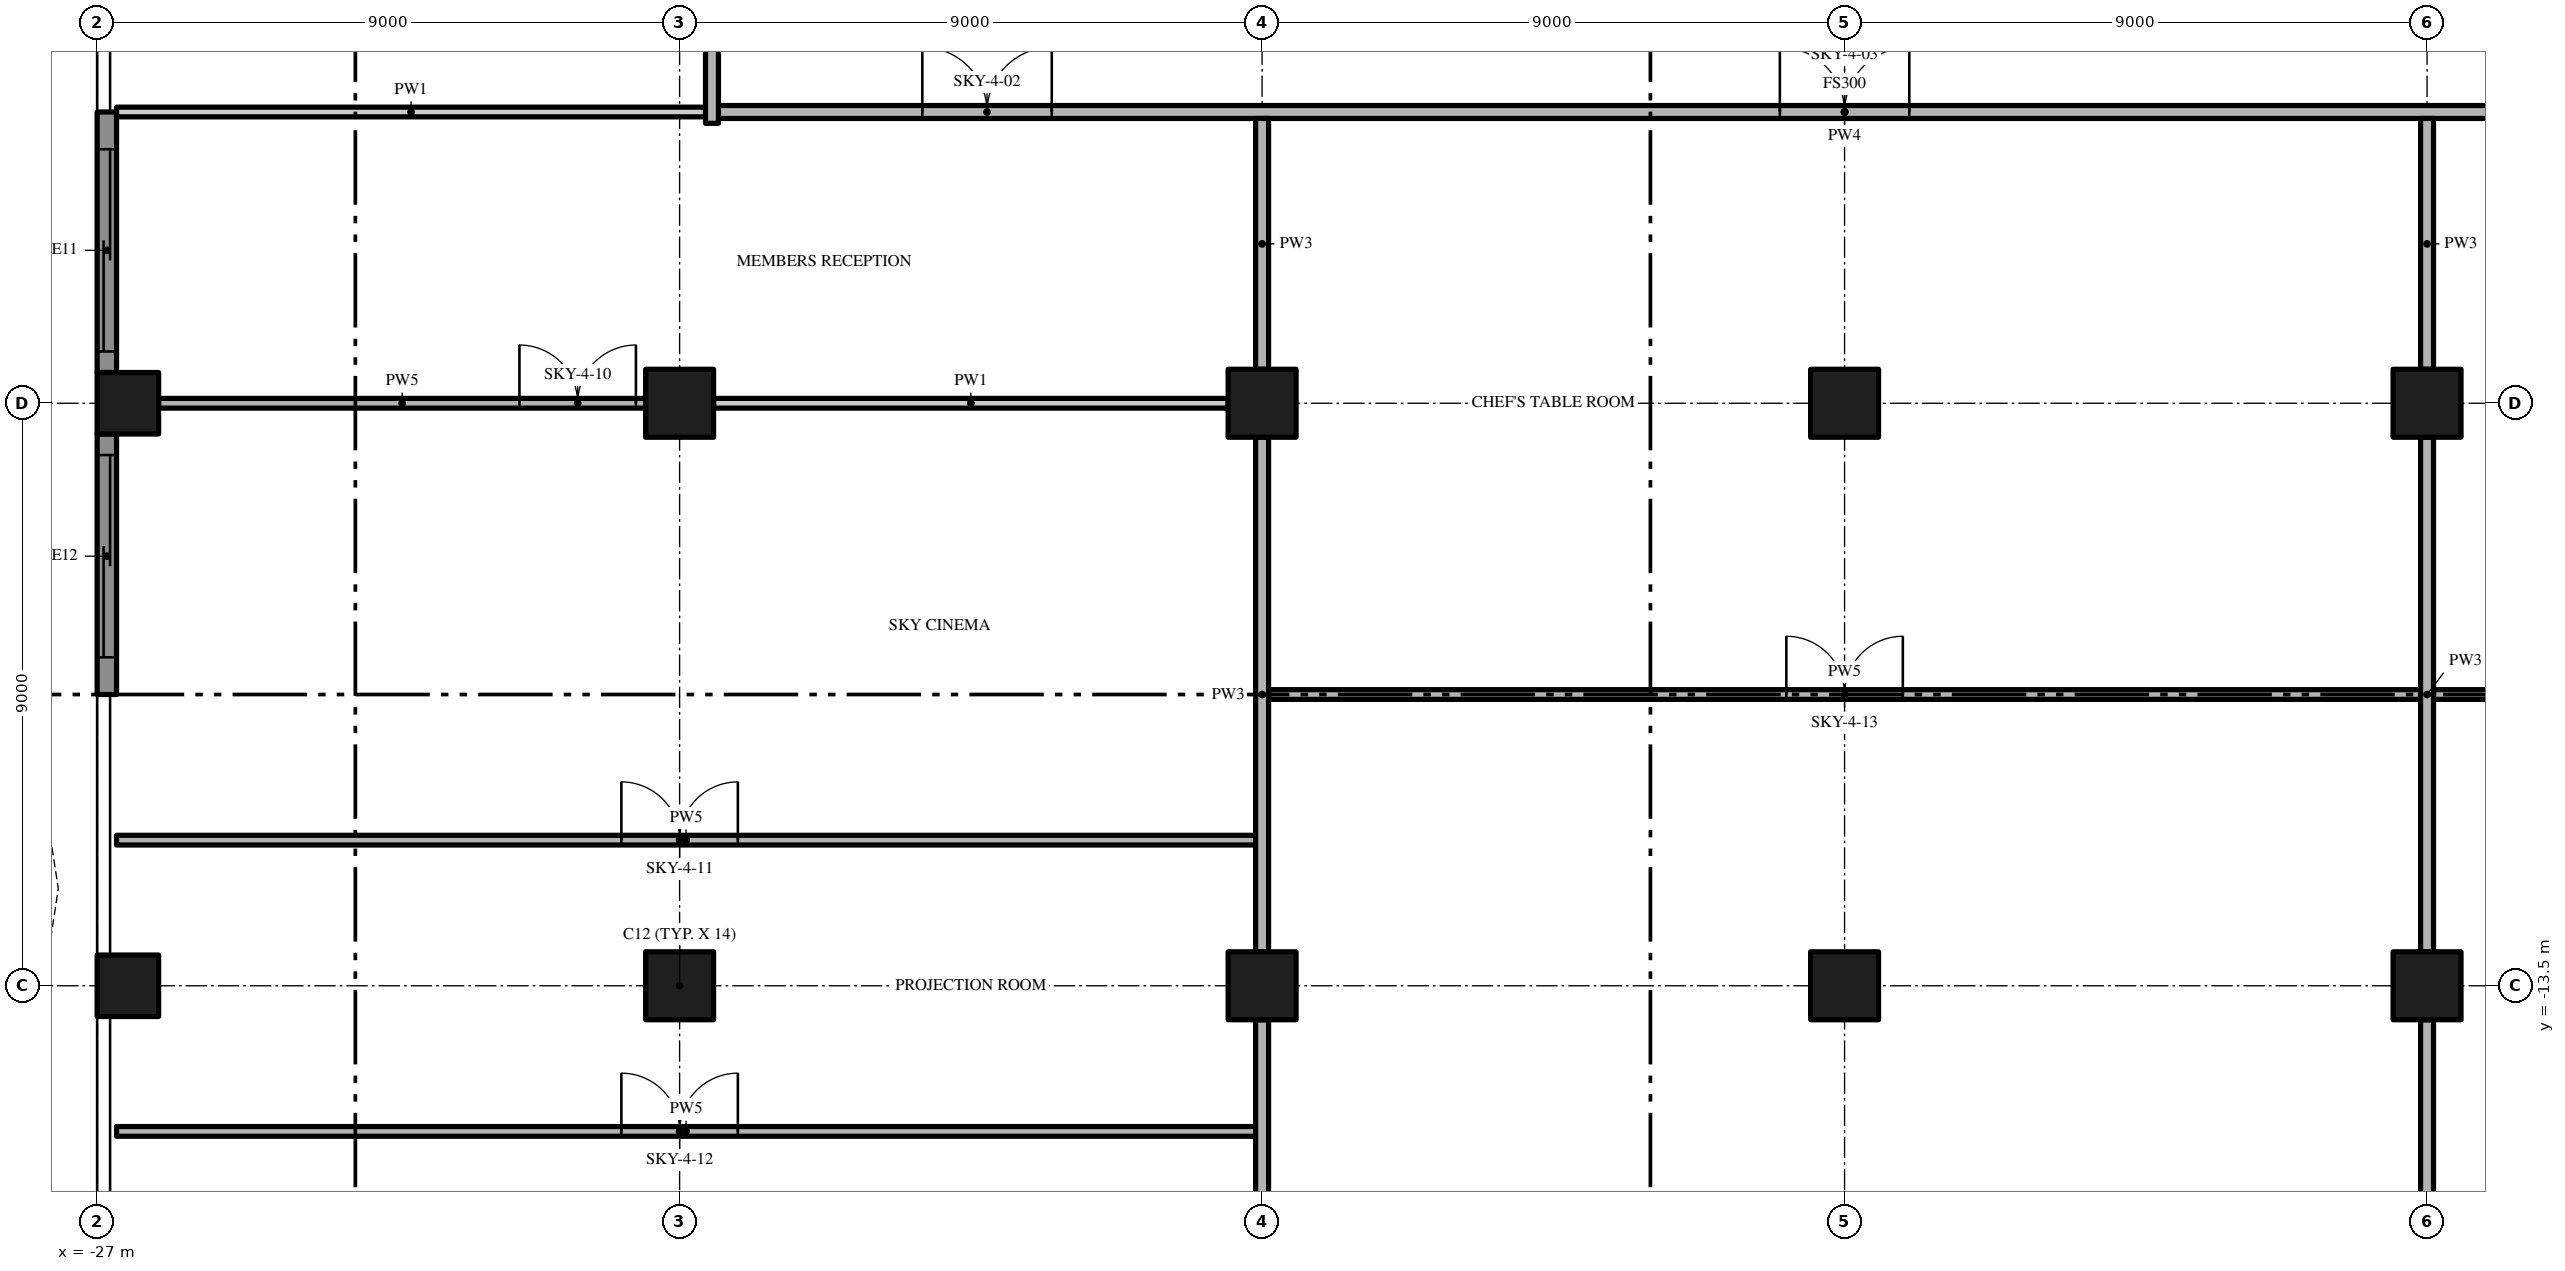
"""IFC4 building model, lengths in metres.
Left out: names, types, materials, properties, quantities, classifications, styles, units other than length and angle.
Written with IfcOpenShell. Run it as: python <this file> out.ifc"""

import sys

from ifc_helpers import new_model, si_unit, direction, frame, frame_2d, origin, origin_2d, place, context, subcontext, project, spatial, polyline, rectangle, outline, extrude, element, fill, save


model = new_model("IFC4")
c1 = context("Model", 3, precision=1e-05, world=origin(), true_north=direction((0.0, 1.0)))
c2 = subcontext(c1, "Body", "Model", "MODEL_VIEW")
j1 = project(units=[si_unit("LENGTHUNIT", "METRE"), si_unit("PLANEANGLEUNIT", "RADIAN")], contexts=[c1])
p1 = place(None, origin())
s1 = spatial("IfcSite", under=j1, at=p1, CompositionType="ELEMENT")
p2 = place(p1, origin())
s2 = spatial("IfcBuilding", under=s1, at=p2, CompositionType="ELEMENT")
p3 = place(p2, frame((0.0, 0.0, 233.8)))
s3 = spatial("IfcBuildingStorey", under=s2, at=p3, CompositionType="ELEMENT", Elevation=233.8)
for number, where, z_axis, x_axis in (
    (1, (-18.0, -13.5, 0.0), (0.0, 0.0, 1.0), (1.0, 0.0, 0.0)),
    (2, (-18.0, -4.5, 0.0), (0.0, 0.0, 1.0), (1.0, 0.0, 0.0)),
):
    element("IfcColumn", number, at=place(p3, frame(where, z_axis=z_axis, x_axis=x_axis)), inside=s3, PredefinedType="COLUMN", context=c2, shape_type="SweptSolid", body=[
        extrude(rectangle(XDim=1.05, YDim=1.05, at=origin_2d()), origin(), (0.0, 0.0, 1.0), 4.7),
    ])
for number, where, z_axis, x_axis in (
    (3, (-26.525, -13.5, 0.0), (0.0, 0.0, 1.0), (1.0, 0.0, 0.0)),
    (4, (-26.525, -4.5, 0.0), (0.0, 0.0, 1.0), (1.0, 0.0, 0.0)),
):
    element("IfcColumn", number, at=place(p3, frame(where, z_axis=z_axis, x_axis=x_axis)), inside=s3, PredefinedType="COLUMN", context=c2, shape_type="SweptSolid", body=[
        extrude(rectangle(XDim=0.95, YDim=0.95, at=origin_2d()), origin(), (0.0, 0.0, 1.0), 4.7),
    ])
for number, where, z_axis, x_axis in (
    (5, (-9.0, -13.5, 0.0), (0.0, 0.0, 1.0), (1.0, 0.0, 0.0)),
    (6, (-9.0, -4.5, 0.0), (0.0, 0.0, 1.0), (1.0, 0.0, 0.0)),
    (7, (0.0, -13.5, 0.0), (0.0, 0.0, 1.0), (1.0, 0.0, 0.0)),
    (8, (0.0, -4.5, 0.0), (0.0, 0.0, 1.0), (1.0, 0.0, 0.0)),
    (9, (9.0, -13.5, 0.0), (0.0, 0.0, 1.0), (1.0, 0.0, 0.0)),
    (10, (9.0, -4.5, 0.0), (0.0, 0.0, 1.0), (1.0, 0.0, 0.0)),
):
    element("IfcColumn", number, at=place(p3, frame(where, z_axis=z_axis, x_axis=x_axis)), inside=s3, PredefinedType="COLUMN", context=c2, shape_type="SweptSolid", body=[
        extrude(rectangle(XDim=1.05, YDim=1.05, at=origin_2d()), origin(), (0.0, 0.0, 1.0), 4.7),
    ])
p4 = place(p3, frame((-26.85, -4.025, 0.0), z_axis=(0.0, 0.0, 1.0), x_axis=(0.0, 1.0, 0.0)))
e11 = element("IfcWall", 11, at=p4, inside=s3, PredefinedType="SOLIDWALL", context=c2, shape_type="SweptSolid", body=[
    extrude(rectangle(XDim=4.025, YDim=0.3, at=frame_2d((2.013, 0.0))), origin(), (0.0, 0.0, 1.0), 4.7),
])
p5 = place(p4, frame((0.325, 0.0, 0.0)))
e12 = element("IfcOpeningElement", 12, at=p5, cuts=e11, PredefinedType="OPENING", context=c2, shape_type="SweptSolid", body=[
    extrude(rectangle(XDim=3.125, YDim=2.4, at=frame_2d((1.562, 1.2))), frame((0.0, 0.16, 0.0), z_axis=(0.0, -1.0, 0.0), x_axis=(1.0, 0.0, 0.0)), (0.0, 0.0, 1.0), 0.32),
])
p6 = place(p3, frame((-26.85, -9.0, 0.0), z_axis=(0.0, 0.0, 1.0), x_axis=(0.0, 1.0, 0.0)))
e13 = element("IfcWall", 13, at=p6, inside=s3, PredefinedType="SOLIDWALL", context=c2, shape_type="SweptSolid", body=[
    extrude(rectangle(XDim=4.025, YDim=0.3, at=frame_2d((2.013, 0.0))), origin(), (0.0, 0.0, 1.0), 4.7),
])
p7 = place(p6, frame((0.575, 0.0, 0.0)))
e14 = element("IfcOpeningElement", 14, at=p7, cuts=e13, PredefinedType="OPENING", context=c2, shape_type="SweptSolid", body=[
    extrude(rectangle(XDim=3.125, YDim=2.4, at=frame_2d((1.562, 1.2))), frame((0.0, 0.16, 0.0), z_axis=(0.0, -1.0, 0.0), x_axis=(1.0, 0.0, 0.0)), (0.0, 0.0, 1.0), 0.32),
])
p8 = place(p3, origin())
e15 = element("IfcWall", 15, at=p8, inside=s3, PredefinedType="USERDEFINED", context=c2, shape_type="SweptSolid", body=[
    extrude(outline(polyline([(-27.6, 18.0), (-27.829, 16.5), (-28.429, 15.0), (-29.171, 13.5), (-29.771, 12.0), (-30.0, 10.5), (-29.771, 9.0), (-29.171, 7.5), (-28.429, 6.0), (-27.829, 4.5), (-27.6, 3.0), (-27.829, 1.5), (-28.429, 0.0), (-29.171, -1.5), (-29.771, -3.0), (-30.0, -4.5), (-29.771, -6.0), (-29.171, -7.5), (-28.429, -9.0), (-27.829, -10.5), (-27.6, -12.0), (-27.829, -13.5), (-28.429, -15.0), (-29.171, -16.5), (-29.771, -18.0), (-29.539, -18.093), (-28.942, -16.602), (-28.201, -15.102), (-27.586, -13.566), (-27.347, -12.0), (-27.586, -10.434), (-28.201, -8.898), (-28.942, -7.398), (-29.528, -5.934), (-29.747, -4.5), (-29.528, -3.066), (-28.942, -1.602), (-28.201, -0.102), (-27.586, 1.434), (-27.347, 3.0), (-27.586, 4.566), (-28.201, 6.102), (-28.942, 7.602), (-29.528, 9.066), (-29.747, 10.5), (-29.528, 11.934), (-28.942, 13.398), (-28.201, 14.898), (-27.586, 16.434), (-27.353, 17.962), (-27.6, 18.0)])), origin(), (0.0, 0.0, 1.0), 0.9),
])
p9 = place(p3, frame((-26.7, -15.75, 0.0), z_axis=(0.0, 0.0, 1.0), x_axis=(1.0, 0.0, 0.0)))
e16 = element("IfcWall", 16, at=p9, inside=s3, PredefinedType="PARTITIONING", context=c2, shape_type="SweptSolid", body=[
    extrude(rectangle(XDim=17.6, YDim=0.15, at=frame_2d((8.8, 0.0))), origin(), (0.0, 0.0, 1.0), 4.7),
])
p10 = place(p9, frame((7.8, 0.0, 0.0)))
e17 = element("IfcOpeningElement", 17, at=p10, cuts=e16, PredefinedType="OPENING", context=c2, shape_type="SweptSolid", body=[
    extrude(rectangle(XDim=1.8, YDim=2.4, at=frame_2d((0.9, 1.2))), frame((0.0, 0.085, 0.0), z_axis=(0.0, -1.0, 0.0), x_axis=(1.0, 0.0, 0.0)), (0.0, 0.0, 1.0), 0.17),
])
p11 = place(p3, frame((-26.7, -11.25, 0.0), z_axis=(0.0, 0.0, 1.0), x_axis=(1.0, 0.0, 0.0)))
e18 = element("IfcWall", 18, at=p11, inside=s3, PredefinedType="PARTITIONING", context=c2, shape_type="SweptSolid", body=[
    extrude(rectangle(XDim=17.6, YDim=0.15, at=frame_2d((8.8, 0.0))), origin(), (0.0, 0.0, 1.0), 4.7),
])
p12 = place(p11, frame((7.8, 0.0, 0.0)))
e19 = element("IfcOpeningElement", 19, at=p12, cuts=e18, PredefinedType="OPENING", context=c2, shape_type="SweptSolid", body=[
    extrude(rectangle(XDim=1.8, YDim=2.4, at=frame_2d((0.9, 1.2))), frame((0.0, 0.085, 0.0), z_axis=(0.0, -1.0, 0.0), x_axis=(1.0, 0.0, 0.0)), (0.0, 0.0, 1.0), 0.17),
])
p13 = place(p3, frame((-8.9, -9.0, 0.0), z_axis=(0.0, 0.0, 1.0), x_axis=(1.0, 0.0, 0.0)))
e20 = element("IfcWall", 20, at=p13, inside=s3, PredefinedType="PARTITIONING", context=c2, shape_type="SweptSolid", body=[
    extrude(rectangle(XDim=17.8, YDim=0.15, at=frame_2d((8.9, 0.0))), origin(), (0.0, 0.0, 1.0), 4.7),
])
p14 = place(p13, frame((8.0, 0.0, 0.0)))
e21 = element("IfcOpeningElement", 21, at=p14, cuts=e20, PredefinedType="OPENING", context=c2, shape_type="SweptSolid", body=[
    extrude(rectangle(XDim=1.8, YDim=2.4, at=frame_2d((0.9, 1.2))), frame((0.0, 0.085, 0.0), z_axis=(0.0, -1.0, 0.0), x_axis=(1.0, 0.0, 0.0)), (0.0, 0.0, 1.0), 0.17),
])
p15 = place(p3, frame((9.1, -9.0, 0.0), z_axis=(0.0, 0.0, 1.0), x_axis=(1.0, 0.0, 0.0)))
e22 = element("IfcWall", 22, at=p15, inside=s3, PredefinedType="PARTITIONING", context=c2, shape_type="SweptSolid", body=[
    extrude(rectangle(XDim=17.6, YDim=0.15, at=frame_2d((8.8, 0.0))), origin(), (0.0, 0.0, 1.0), 4.7),
])
p16 = place(p15, frame((8.0, 0.0, 0.0)))
e23 = element("IfcOpeningElement", 23, at=p16, cuts=e22, PredefinedType="OPENING", context=c2, shape_type="SweptSolid", body=[
    extrude(rectangle(XDim=1.8, YDim=2.4, at=frame_2d((0.9, 1.2))), frame((0.0, 0.085, 0.0), z_axis=(0.0, -1.0, 0.0), x_axis=(1.0, 0.0, 0.0)), (0.0, 0.0, 1.0), 0.17),
])
p17 = place(p3, frame((-26.05, -4.5, 0.0), z_axis=(0.0, 0.0, 1.0), x_axis=(1.0, 0.0, 0.0)))
e24 = element("IfcWall", 24, at=p17, inside=s3, PredefinedType="PARTITIONING", context=c2, shape_type="SweptSolid", body=[
    extrude(rectangle(XDim=7.525, YDim=0.15, at=frame_2d((3.763, 0.0))), origin(), (0.0, 0.0, 1.0), 4.7),
])
p18 = place(p17, frame((5.575, 0.0, 0.0)))
e25 = element("IfcOpeningElement", 25, at=p18, cuts=e24, PredefinedType="OPENING", context=c2, shape_type="SweptSolid", body=[
    extrude(rectangle(XDim=1.8, YDim=2.4, at=frame_2d((0.9, 1.2))), frame((0.0, 0.085, 0.0), z_axis=(0.0, -1.0, 0.0), x_axis=(1.0, 0.0, 0.0)), (0.0, 0.0, 1.0), 0.17),
])
p19 = place(p3, frame((-17.475, -4.5, 0.0), z_axis=(0.0, 0.0, 1.0), x_axis=(1.0, 0.0, 0.0)))
e26 = element("IfcWall", 26, at=p19, inside=s3, PredefinedType="PARTITIONING", context=c2, shape_type="SweptSolid", body=[
    extrude(rectangle(XDim=7.95, YDim=0.15, at=frame_2d((3.975, 0.0))), origin(), (0.0, 0.0, 1.0), 4.7),
])
p20 = place(p3, frame((-17.4, 0.0, 0.0), z_axis=(0.0, 0.0, 1.0), x_axis=(1.0, 0.0, 0.0)))
e27 = element("IfcWall", 27, at=p20, inside=s3, PredefinedType="PARTITIONING", context=c2, shape_type="SweptSolid", body=[
    extrude(rectangle(XDim=34.8, YDim=0.2, at=frame_2d((17.4, 0.0))), origin(), (0.0, 0.0, 1.0), 4.7),
])
p21 = place(p20, frame((3.15, 0.0, 0.0)))
e28 = element("IfcOpeningElement", 28, at=p21, cuts=e27, PredefinedType="OPENING", context=c2, shape_type="SweptSolid", body=[
    extrude(rectangle(XDim=2.0, YDim=2.4, at=frame_2d((1.0, 1.2))), frame((0.0, 0.11, 0.0), z_axis=(0.0, -1.0, 0.0), x_axis=(1.0, 0.0, 0.0)), (0.0, 0.0, 1.0), 0.22),
])
p22 = place(p20, frame((16.4, 0.0, 0.0)))
e29 = element("IfcOpeningElement", 29, at=p22, cuts=e27, PredefinedType="OPENING", context=c2, shape_type="SweptSolid", body=[
    extrude(rectangle(XDim=2.0, YDim=2.4, at=frame_2d((1.0, 1.2))), frame((0.0, 0.11, 0.0), z_axis=(0.0, -1.0, 0.0), x_axis=(1.0, 0.0, 0.0)), (0.0, 0.0, 1.0), 0.22),
])
p23 = place(p20, frame((29.65, 0.0, 0.0)))
e30 = element("IfcOpeningElement", 30, at=p23, cuts=e27, PredefinedType="OPENING", context=c2, shape_type="SweptSolid", body=[
    extrude(rectangle(XDim=2.0, YDim=2.4, at=frame_2d((1.0, 1.2))), frame((0.0, 0.11, 0.0), z_axis=(0.0, -1.0, 0.0), x_axis=(1.0, 0.0, 0.0)), (0.0, 0.0, 1.0), 0.22),
])
p24 = place(p3, frame((-26.7, 0.0, 0.0), z_axis=(0.0, 0.0, 1.0), x_axis=(1.0, 0.0, 0.0)))
e31 = element("IfcWall", 31, at=p24, inside=s3, PredefinedType="PARTITIONING", context=c2, shape_type="SweptSolid", body=[
    extrude(rectangle(XDim=9.1, YDim=0.15, at=frame_2d((4.55, 0.0))), origin(), (0.0, 0.0, 1.0), 4.7),
])
p25 = place(p3, frame((-17.5, -0.175, 0.0), z_axis=(0.0, 0.0, 1.0), x_axis=(0.0, 1.0, 0.0)))
e32 = element("IfcWall", 32, at=p25, inside=s3, PredefinedType="PARTITIONING", context=c2, shape_type="SweptSolid", body=[
    extrude(rectangle(XDim=4.15, YDim=0.2, at=frame_2d((2.075, 0.0))), origin(), (0.0, 0.0, 1.0), 4.7),
])
p26 = place(p3, frame((-9.0, -21.55, 0.0), z_axis=(0.0, 0.0, 1.0), x_axis=(0.0, 1.0, 0.0)))
e33 = element("IfcWall", 33, at=p26, inside=s3, PredefinedType="PARTITIONING", context=c2, shape_type="SweptSolid", body=[
    extrude(rectangle(XDim=7.525, YDim=0.2, at=frame_2d((3.763, 0.0))), origin(), (0.0, 0.0, 1.0), 4.7),
])
p27 = place(p3, frame((-9.0, -12.975, 0.0), z_axis=(0.0, 0.0, 1.0), x_axis=(0.0, 1.0, 0.0)))
e34 = element("IfcWall", 34, at=p27, inside=s3, PredefinedType="PARTITIONING", context=c2, shape_type="SweptSolid", body=[
    extrude(rectangle(XDim=7.95, YDim=0.2, at=frame_2d((3.975, 0.0))), origin(), (0.0, 0.0, 1.0), 4.7),
])
p28 = place(p3, frame((-9.0, -3.975, 0.0), z_axis=(0.0, 0.0, 1.0), x_axis=(0.0, 1.0, 0.0)))
e35 = element("IfcWall", 35, at=p28, inside=s3, PredefinedType="PARTITIONING", context=c2, shape_type="SweptSolid", body=[
    extrude(rectangle(XDim=3.875, YDim=0.2, at=frame_2d((1.938, 0.0))), origin(), (0.0, 0.0, 1.0), 4.7),
])
p29 = place(p3, frame((9.0, -21.55, 0.0), z_axis=(0.0, 0.0, 1.0), x_axis=(0.0, 1.0, 0.0)))
e36 = element("IfcWall", 36, at=p29, inside=s3, PredefinedType="PARTITIONING", context=c2, shape_type="SweptSolid", body=[
    extrude(rectangle(XDim=7.525, YDim=0.2, at=frame_2d((3.763, 0.0))), origin(), (0.0, 0.0, 1.0), 4.7),
])
p30 = place(p3, frame((9.0, -12.975, 0.0), z_axis=(0.0, 0.0, 1.0), x_axis=(0.0, 1.0, 0.0)))
e37 = element("IfcWall", 37, at=p30, inside=s3, PredefinedType="PARTITIONING", context=c2, shape_type="SweptSolid", body=[
    extrude(rectangle(XDim=7.95, YDim=0.2, at=frame_2d((3.975, 0.0))), origin(), (0.0, 0.0, 1.0), 4.7),
])
p31 = place(p3, frame((9.0, -3.975, 0.0), z_axis=(0.0, 0.0, 1.0), x_axis=(0.0, 1.0, 0.0)))
e38 = element("IfcWall", 38, at=p31, inside=s3, PredefinedType="PARTITIONING", context=c2, shape_type="SweptSolid", body=[
    extrude(rectangle(XDim=3.875, YDim=0.2, at=frame_2d((1.938, 0.0))), origin(), (0.0, 0.0, 1.0), 4.7),
])
p32 = place(p5, origin())
e39 = element("IfcDoor", 39, at=p32, inside=s3, OperationType="SINGLE_SWING_LEFT", PredefinedType="DOOR", context=c2, shape_type="SweptSolid", body=[
    extrude(rectangle(XDim=3.125, YDim=2.4, at=frame_2d((1.562, 1.2))), frame((0.0, 0.025, 0.0), z_axis=(0.0, -1.0, 0.0), x_axis=(1.0, 0.0, 0.0)), (0.0, 0.0, 1.0), 0.05),
])
fill(e12, e39)
p33 = place(p7, origin())
e40 = element("IfcDoor", 40, at=p33, inside=s3, OperationType="SINGLE_SWING_LEFT", PredefinedType="DOOR", context=c2, shape_type="SweptSolid", body=[
    extrude(rectangle(XDim=3.125, YDim=2.4, at=frame_2d((1.562, 1.2))), frame((0.0, 0.025, 0.0), z_axis=(0.0, -1.0, 0.0), x_axis=(1.0, 0.0, 0.0)), (0.0, 0.0, 1.0), 0.05),
])
fill(e14, e40)
p34 = place(p21, origin())
e41 = element("IfcDoor", 41, at=p34, inside=s3, OperationType="DOUBLE_DOOR_SINGLE_SWING", PredefinedType="DOOR", context=c2, shape_type="SweptSolid", body=[
    extrude(rectangle(XDim=2.0, YDim=2.4, at=frame_2d((1.0, 1.2))), frame((0.0, 0.025, 0.0), z_axis=(0.0, -1.0, 0.0), x_axis=(1.0, 0.0, 0.0)), (0.0, 0.0, 1.0), 0.05),
])
fill(e28, e41)
p35 = place(p22, origin())
e42 = element("IfcDoor", 42, at=p35, inside=s3, OperationType="DOUBLE_DOOR_SINGLE_SWING", PredefinedType="DOOR", context=c2, shape_type="SweptSolid", body=[
    extrude(rectangle(XDim=2.0, YDim=2.4, at=frame_2d((1.0, 1.2))), frame((0.0, 0.025, 0.0), z_axis=(0.0, -1.0, 0.0), x_axis=(1.0, 0.0, 0.0)), (0.0, 0.0, 1.0), 0.05),
])
fill(e29, e42)
p36 = place(p18, origin())
e43 = element("IfcDoor", 43, at=p36, inside=s3, OperationType="DOUBLE_DOOR_SINGLE_SWING", PredefinedType="DOOR", context=c2, shape_type="SweptSolid", body=[
    extrude(rectangle(XDim=1.8, YDim=2.4, at=frame_2d((0.9, 1.2))), frame((0.0, 0.025, 0.0), z_axis=(0.0, -1.0, 0.0), x_axis=(1.0, 0.0, 0.0)), (0.0, 0.0, 1.0), 0.05),
])
fill(e25, e43)
p37 = place(p12, origin())
e44 = element("IfcDoor", 44, at=p37, inside=s3, OperationType="DOUBLE_DOOR_SINGLE_SWING", PredefinedType="DOOR", context=c2, shape_type="SweptSolid", body=[
    extrude(rectangle(XDim=1.8, YDim=2.4, at=frame_2d((0.9, 1.2))), frame((0.0, 0.025, 0.0), z_axis=(0.0, -1.0, 0.0), x_axis=(1.0, 0.0, 0.0)), (0.0, 0.0, 1.0), 0.05),
])
fill(e19, e44)
p38 = place(p10, origin())
e45 = element("IfcDoor", 45, at=p38, inside=s3, OperationType="DOUBLE_DOOR_SINGLE_SWING", PredefinedType="DOOR", context=c2, shape_type="SweptSolid", body=[
    extrude(rectangle(XDim=1.8, YDim=2.4, at=frame_2d((0.9, 1.2))), frame((0.0, 0.025, 0.0), z_axis=(0.0, -1.0, 0.0), x_axis=(1.0, 0.0, 0.0)), (0.0, 0.0, 1.0), 0.05),
])
fill(e17, e45)
p39 = place(p14, origin())
e46 = element("IfcDoor", 46, at=p39, inside=s3, OperationType="DOUBLE_DOOR_SINGLE_SWING", PredefinedType="DOOR", context=c2, shape_type="SweptSolid", body=[
    extrude(rectangle(XDim=1.8, YDim=2.4, at=frame_2d((0.9, 1.2))), frame((0.0, 0.025, 0.0), z_axis=(0.0, -1.0, 0.0), x_axis=(1.0, 0.0, 0.0)), (0.0, 0.0, 1.0), 0.05),
])
fill(e21, e46)
save(model, sys.argv[1])
